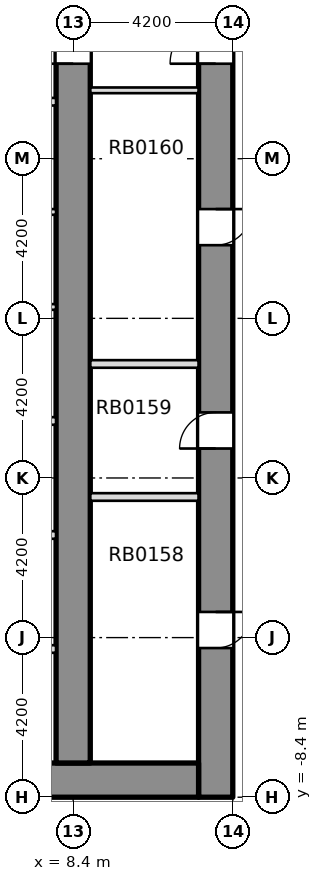
"""IFC4 building model, lengths in metres.
Left out: names, types, materials, properties, quantities, classifications, styles, units other than length and angle.
Written with IfcOpenShell. Run it as: python <this file> out.ifc"""

import sys

from ifc_helpers import new_model, si_unit, direction, frame, frame_2d, origin, place, context, subcontext, project, spatial, rectangle, extrude, element, fill, save


model = new_model("IFC4")
c1 = context("Model", 3, precision=1e-05, world=origin(), true_north=direction((0.0, 1.0)))
c2 = subcontext(c1, "Body", "Model", "MODEL_VIEW")
j1 = project(units=[si_unit("LENGTHUNIT", "METRE"), si_unit("PLANEANGLEUNIT", "RADIAN")], contexts=[c1])
p1 = place(None, origin())
s1 = spatial("IfcSite", under=j1, at=p1, CompositionType="ELEMENT")
p2 = place(p1, origin())
s2 = spatial("IfcBuilding", under=s1, at=p2, CompositionType="ELEMENT")
p3 = place(p2, frame((0.0, 0.0, -4.2)))
s3 = spatial("IfcBuildingStorey", under=s2, at=p3, CompositionType="ELEMENT", Elevation=-4.2)
p4 = place(p3, frame((12.15, -8.4, -0.35), z_axis=(0.0, 0.0, 1.0), x_axis=(0.0, 1.0, 0.0)))
e1 = element("IfcWall", 1, at=p4, inside=s3, PredefinedType="SHEAR", context=c2, shape_type="SweptSolid", body=[
    extrude(rectangle(XDim=30.15, YDim=0.9, at=frame_2d((15.075, 0.0))), origin(), (0.0, 0.0, 1.0), 4.1),
])
p5 = place(p4, frame((3.925, 0.0, 0.35)))
e2 = element("IfcOpeningElement", 2, at=p5, cuts=e1, PredefinedType="OPENING", context=c2, shape_type="SweptSolid", body=[
    extrude(rectangle(XDim=0.95, YDim=2.1, at=frame_2d((0.475, 1.05))), frame((0.0, 0.46, 0.0), z_axis=(0.0, -1.0, 0.0), x_axis=(1.0, 0.0, 0.0)), (0.0, 0.0, 1.0), 0.92),
])
p6 = place(p4, frame((9.175, 0.0, 0.35)))
e3 = element("IfcOpeningElement", 3, at=p6, cuts=e1, PredefinedType="OPENING", context=c2, shape_type="SweptSolid", body=[
    extrude(rectangle(XDim=0.95, YDim=2.1, at=frame_2d((0.475, 1.05))), frame((0.0, 0.46, 0.0), z_axis=(0.0, -1.0, 0.0), x_axis=(1.0, 0.0, 0.0)), (0.0, 0.0, 1.0), 0.92),
])
p7 = place(p4, frame((14.525, 0.0, 0.35)))
e4 = element("IfcOpeningElement", 4, at=p7, cuts=e1, PredefinedType="OPENING", context=c2, shape_type="SweptSolid", body=[
    extrude(rectangle(XDim=0.95, YDim=2.1, at=frame_2d((0.475, 1.05))), frame((0.0, 0.46, 0.0), z_axis=(0.0, -1.0, 0.0), x_axis=(1.0, 0.0, 0.0)), (0.0, 0.0, 1.0), 0.92),
])
p8 = place(p4, frame((22.225, 0.0, 0.35)))
e5 = element("IfcOpeningElement", 5, at=p8, cuts=e1, PredefinedType="OPENING", context=c2, shape_type="SweptSolid", body=[
    extrude(rectangle(XDim=0.95, YDim=2.1, at=frame_2d((0.475, 1.05))), frame((0.0, 0.46, 0.0), z_axis=(0.0, -1.0, 0.0), x_axis=(1.0, 0.0, 0.0)), (0.0, 0.0, 1.0), 0.92),
])
p9 = place(p4, frame((26.25, 0.0, 0.35)))
e6 = element("IfcOpeningElement", 6, at=p9, cuts=e1, PredefinedType="OPENING", context=c2, shape_type="SweptSolid", body=[
    extrude(rectangle(XDim=0.95, YDim=2.1, at=frame_2d((0.475, 1.05))), frame((0.0, 0.46, 0.0), z_axis=(0.0, -1.0, 0.0), x_axis=(1.0, 0.0, 0.0)), (0.0, 0.0, 1.0), 0.92),
])
p10 = place(p4, frame((19.3, 0.0, 0.35)))
e7 = element("IfcOpeningElement", 7, at=p10, cuts=e1, PredefinedType="OPENING", context=c2, shape_type="SweptSolid", body=[
    extrude(rectangle(XDim=1.2, YDim=2.1, at=frame_2d((0.6, 1.05))), frame((0.0, 0.46, 0.0), z_axis=(0.0, -1.0, 0.0), x_axis=(1.0, 0.0, 0.0)), (0.0, 0.0, 1.0), 0.92),
])
p11 = place(p3, frame((-11.7, -7.95, -0.35), z_axis=(0.0, 0.0, 1.0), x_axis=(1.0, 0.0, 0.0)))
e8 = element("IfcWall", 8, at=p11, inside=s3, PredefinedType="SHEAR", context=c2, shape_type="SweptSolid", body=[
    extrude(rectangle(XDim=23.4, YDim=0.9, at=frame_2d((11.7, 0.0))), origin(), (0.0, 0.0, 1.0), 4.1),
])
p12 = place(p11, frame((6.95, 0.0, 0.35)))
e9 = element("IfcOpeningElement", 9, at=p12, cuts=e8, PredefinedType="OPENING", context=c2, shape_type="SweptSolid", body=[
    extrude(rectangle(XDim=1.8, YDim=2.1, at=frame_2d((0.9, 1.05))), frame((0.0, 0.46, 0.0), z_axis=(0.0, -1.0, 0.0), x_axis=(1.0, 0.0, 0.0)), (0.0, 0.0, 1.0), 0.92),
])
p13 = place(p11, frame((14.65, 0.0, 0.35)))
e10 = element("IfcOpeningElement", 10, at=p13, cuts=e8, PredefinedType="OPENING", context=c2, shape_type="SweptSolid", body=[
    extrude(rectangle(XDim=1.8, YDim=2.1, at=frame_2d((0.9, 1.05))), frame((0.0, 0.46, 0.0), z_axis=(0.0, -1.0, 0.0), x_axis=(1.0, 0.0, 0.0)), (0.0, 0.0, 1.0), 0.92),
])
p14 = place(p3, frame((8.4, -7.5, -0.35), z_axis=(0.0, 0.0, 1.0), x_axis=(0.0, 1.0, 0.0)))
e11 = element("IfcWall", 11, at=p14, inside=s3, PredefinedType="SHEAR", context=c2, shape_type="SweptSolid", body=[
    extrude(rectangle(XDim=28.35, YDim=0.9, at=frame_2d((14.175, 0.0))), origin(), (0.0, 0.0, 1.0), 4.1),
])
p15 = place(p14, frame((18.4, 0.0, 0.35)))
e12 = element("IfcOpeningElement", 12, at=p15, cuts=e11, PredefinedType="OPENING", context=c2, shape_type="SweptSolid", body=[
    extrude(rectangle(XDim=1.2, YDim=2.1, at=frame_2d((0.6, 1.05))), frame((0.0, 0.46, 0.0), z_axis=(0.0, -1.0, 0.0), x_axis=(1.0, 0.0, 0.0)), (0.0, 0.0, 1.0), 0.92),
])
for number, where, z_axis, x_axis in (
    (13, (5.575, -4.5, 0.0), (0.0, 0.0, 1.0), (1.0, 0.0, 0.0)),
    (14, (5.575, -1.5, 0.0), (0.0, 0.0, 1.0), (1.0, 0.0, 0.0)),
    (15, (5.575, 1.5, 0.0), (0.0, 0.0, 1.0), (1.0, 0.0, 0.0)),
):
    element("IfcWall", number, at=place(p3, frame(where, z_axis=z_axis, x_axis=x_axis)), inside=s3, PredefinedType="PARTITIONING", context=c2, shape_type="SweptSolid", body=[
        extrude(rectangle(XDim=2.374, YDim=0.2, at=frame_2d((1.187, 0.0))), origin(), (0.0, 0.0, 1.0), 3.75),
    ])
p16 = place(p3, frame((5.425, 4.5, 0.0), z_axis=(0.0, 0.0, 1.0), x_axis=(1.0, 0.0, 0.0)))
e16 = element("IfcWall", 16, at=p16, inside=s3, PredefinedType="PARTITIONING", context=c2, shape_type="SweptSolid", body=[
    extrude(rectangle(XDim=2.524, YDim=0.15, at=frame_2d((1.262, 0.0))), origin(), (0.0, 0.0, 1.0), 3.75),
])
p17 = place(p3, frame((-7.949, 7.0, 0.0), z_axis=(0.0, 0.0, 1.0), x_axis=(1.0, 0.0, 0.0)))
e17 = element("IfcWall", 17, at=p17, inside=s3, PredefinedType="PARTITIONING", context=c2, shape_type="SweptSolid", body=[
    extrude(rectangle(XDim=15.898, YDim=0.15, at=frame_2d((7.949, 0.0))), origin(), (0.0, 0.0, 1.0), 3.75),
])
p18 = place(p17, frame((7.249, 0.0, 0.0)))
e18 = element("IfcOpeningElement", 18, at=p18, cuts=e17, PredefinedType="OPENING", context=c2, shape_type="SweptSolid", body=[
    extrude(rectangle(XDim=1.4, YDim=2.1, at=frame_2d((0.7, 1.05))), frame((0.0, 0.085, 0.0), z_axis=(0.0, -1.0, 0.0), x_axis=(1.0, 0.0, 0.0)), (0.0, 0.0, 1.0), 0.17),
])
p19 = place(p3, frame((3.6, 9.9, 0.0), z_axis=(0.0, 0.0, 1.0), x_axis=(1.0, 0.0, 0.0)))
e19 = element("IfcWall", 19, at=p19, inside=s3, PredefinedType="PARTITIONING", context=c2, shape_type="SweptSolid", body=[
    extrude(rectangle(XDim=4.349, YDim=0.2, at=frame_2d((2.174, 0.0))), origin(), (0.0, 0.0, 1.0), 3.75),
])
p20 = place(p19, frame((2.25, 0.0, 0.0)))
e20 = element("IfcOpeningElement", 20, at=p20, cuts=e19, PredefinedType="OPENING", context=c2, shape_type="SweptSolid", body=[
    extrude(rectangle(XDim=1.1, YDim=2.1, at=frame_2d((0.55, 1.05))), frame((0.0, 0.11, 0.0), z_axis=(0.0, -1.0, 0.0), x_axis=(1.0, 0.0, 0.0)), (0.0, 0.0, 1.0), 0.22),
])
for number, where, z_axis, x_axis in (
    (21, (8.851, -0.5, 0.0), (0.0, 0.0, 1.0), (1.0, 0.0, 0.0)),
    (22, (8.851, 3.0, 0.0), (0.0, 0.0, 1.0), (1.0, 0.0, 0.0)),
):
    element("IfcWall", number, at=place(p3, frame(where, z_axis=z_axis, x_axis=x_axis)), inside=s3, PredefinedType="PARTITIONING", context=c2, shape_type="SweptSolid", body=[
        extrude(rectangle(XDim=2.848, YDim=0.2, at=frame_2d((1.424, 0.0))), origin(), (0.0, 0.0, 1.0), 3.75),
    ])
p21 = place(p3, frame((8.851, 10.2, 0.0), z_axis=(0.0, 0.0, 1.0), x_axis=(1.0, 0.0, 0.0)))
e23 = element("IfcWall", 23, at=p21, inside=s3, PredefinedType="PARTITIONING", context=c2, shape_type="SweptSolid", body=[
    extrude(rectangle(XDim=2.848, YDim=0.15, at=frame_2d((1.424, 0.0))), origin(), (0.0, 0.0, 1.0), 3.75),
])
p22 = place(p5, origin())
e24 = element("IfcDoor", 24, at=p22, inside=s3, OperationType="SINGLE_SWING_LEFT", PredefinedType="DOOR", context=c2, shape_type="SweptSolid", body=[
    extrude(rectangle(XDim=0.95, YDim=2.1, at=frame_2d((0.475, 1.05))), frame((0.0, 0.025, 0.0), z_axis=(0.0, -1.0, 0.0), x_axis=(1.0, 0.0, 0.0)), (0.0, 0.0, 1.0), 0.05),
])
fill(e2, e24)
p23 = place(p6, origin())
e25 = element("IfcDoor", 25, at=p23, inside=s3, OperationType="SINGLE_SWING_LEFT", PredefinedType="DOOR", context=c2, shape_type="SweptSolid", body=[
    extrude(rectangle(XDim=0.95, YDim=2.1, at=frame_2d((0.475, 1.05))), frame((0.0, 0.025, 0.0), z_axis=(0.0, -1.0, 0.0), x_axis=(1.0, 0.0, 0.0)), (0.0, 0.0, 1.0), 0.05),
])
fill(e3, e25)
p24 = place(p7, origin())
e26 = element("IfcDoor", 26, at=p24, inside=s3, OperationType="SINGLE_SWING_LEFT", PredefinedType="DOOR", context=c2, shape_type="SweptSolid", body=[
    extrude(rectangle(XDim=0.95, YDim=2.1, at=frame_2d((0.475, 1.05))), frame((0.0, 0.025, 0.0), z_axis=(0.0, -1.0, 0.0), x_axis=(1.0, 0.0, 0.0)), (0.0, 0.0, 1.0), 0.05),
])
fill(e4, e26)
p25 = place(p10, origin())
e27 = element("IfcDoor", 27, at=p25, inside=s3, OperationType="SINGLE_SWING_LEFT", PredefinedType="DOOR", context=c2, shape_type="SweptSolid", body=[
    extrude(rectangle(XDim=1.2, YDim=2.1, at=frame_2d((0.6, 1.05))), frame((0.0, 0.025, 0.0), z_axis=(0.0, -1.0, 0.0), x_axis=(1.0, 0.0, 0.0)), (0.0, 0.0, 1.0), 0.05),
])
fill(e7, e27)
p26 = place(p15, origin())
e28 = element("IfcDoor", 28, at=p26, inside=s3, OperationType="SINGLE_SWING_LEFT", PredefinedType="DOOR", context=c2, shape_type="SweptSolid", body=[
    extrude(rectangle(XDim=1.2, YDim=2.1, at=frame_2d((0.6, 1.05))), frame((0.0, 0.025, 0.0), z_axis=(0.0, -1.0, 0.0), x_axis=(1.0, 0.0, 0.0)), (0.0, 0.0, 1.0), 0.05),
])
fill(e12, e28)
save(model, sys.argv[1])
